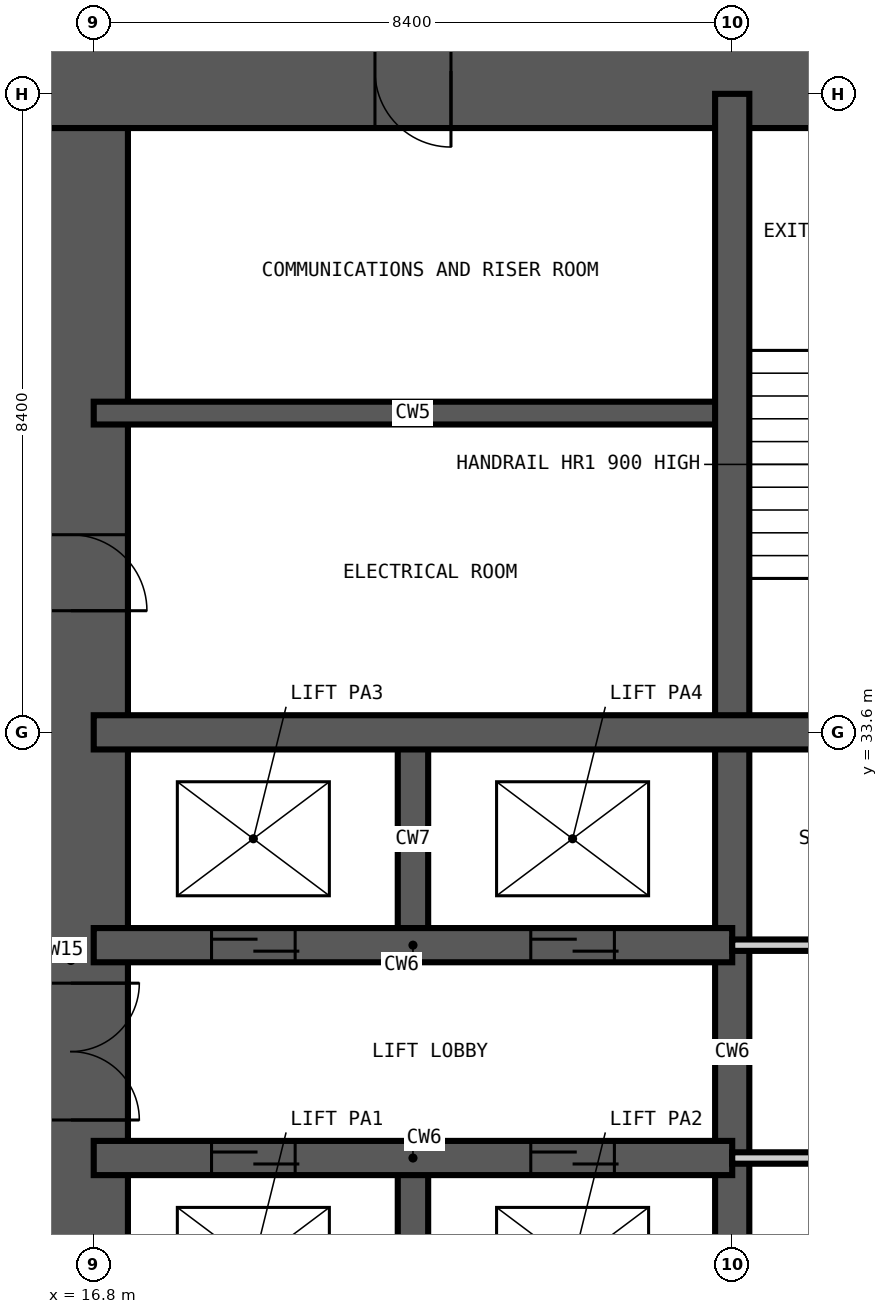
"""IFC4 building model, lengths in metres.
Left out: names, types, materials, properties, quantities, classifications, styles, units other than length and angle.
Written with IfcOpenShell. Run it as: python <this file> out.ifc"""

import sys

from ifc_helpers import new_model, si_unit, direction, frame, frame_2d, origin, place, context, subcontext, project, spatial, rectangle, extrude, element, fill, save


model = new_model("IFC4")
c1 = context("Model", 3, precision=1e-05, world=origin(), true_north=direction((0.0, 1.0)))
c2 = subcontext(c1, "Body", "Model", "MODEL_VIEW")
j1 = project(units=[si_unit("LENGTHUNIT", "METRE"), si_unit("PLANEANGLEUNIT", "RADIAN")], contexts=[c1])
p1 = place(None, origin())
s1 = spatial("IfcSite", under=j1, at=p1, CompositionType="ELEMENT")
p2 = place(p1, origin())
s2 = spatial("IfcBuilding", under=s1, at=p2, CompositionType="ELEMENT")
p3 = place(p2, frame((0.0, 0.0, 63.0)))
s3 = spatial("IfcBuildingStorey", under=s2, at=p3, CompositionType="ELEMENT", Elevation=63.0)
p4 = place(p3, frame((43.05, 42.3, -0.35), z_axis=(0.0, 0.0, 1.0), x_axis=(-1.0, 0.0, 0.0)))
e1 = element("IfcWall", 1, at=p4, inside=s3, PredefinedType="SHEAR", context=c2, shape_type="SweptSolid", body=[
    extrude(rectangle(XDim=27.3, YDim=1.5, at=frame_2d((13.65, 0.0))), origin(), (0.0, 0.0, 1.0), 3.6),
])
p5 = place(p4, frame((21.55, 0.0, 0.35)))
e2 = element("IfcOpeningElement", 2, at=p5, cuts=e1, PredefinedType="OPENING", context=c2, shape_type="SweptSolid", body=[
    extrude(rectangle(XDim=1.0, YDim=2.1, at=frame_2d((0.5, 1.05))), frame((0.0, 0.76, 0.0), z_axis=(0.0, -1.0, 0.0), x_axis=(1.0, 0.0, 0.0)), (0.0, 0.0, 1.0), 1.52),
])
p6 = place(p4, frame((10.95, 0.0, 0.35)))
e3 = element("IfcOpeningElement", 3, at=p6, cuts=e1, PredefinedType="OPENING", context=c2, shape_type="SweptSolid", body=[
    extrude(rectangle(XDim=1.2, YDim=2.2, at=frame_2d((0.6, 1.1))), frame((0.0, 0.76, 0.0), z_axis=(0.0, -1.0, 0.0), x_axis=(1.0, 0.0, 0.0)), (0.0, 0.0, 1.0), 1.52),
])
p7 = place(p3, frame((16.5, 41.55, -0.35), z_axis=(0.0, 0.0, 1.0), x_axis=(0.0, -1.0, 0.0)))
e4 = element("IfcWall", 4, at=p7, inside=s3, PredefinedType="SHEAR", context=c2, shape_type="SweptSolid", body=[
    extrude(rectangle(XDim=24.3, YDim=1.5, at=frame_2d((12.15, 0.0))), origin(), (0.0, 0.0, 1.0), 3.6),
])
p8 = place(p7, frame((11.25, 0.0, 0.35)))
e5 = element("IfcOpeningElement", 5, at=p8, cuts=e4, PredefinedType="OPENING", context=c2, shape_type="SweptSolid", body=[
    extrude(rectangle(XDim=1.8, YDim=2.2, at=frame_2d((0.9, 1.1))), frame((0.0, 0.76, 0.0), z_axis=(0.0, -1.0, 0.0), x_axis=(1.0, 0.0, 0.0)), (0.0, 0.0, 1.0), 1.52),
])
p9 = place(p7, frame((20.05, 0.0, 0.35)))
e6 = element("IfcOpeningElement", 6, at=p9, cuts=e4, PredefinedType="OPENING", context=c2, shape_type="SweptSolid", body=[
    extrude(rectangle(XDim=1.0, YDim=2.1, at=frame_2d((0.5, 1.05))), frame((0.0, 0.76, 0.0), z_axis=(0.0, -1.0, 0.0), x_axis=(1.0, 0.0, 0.0)), (0.0, 0.0, 1.0), 1.52),
])
p10 = place(p7, frame((5.35, 0.0, 0.35)))
e7 = element("IfcOpeningElement", 7, at=p10, cuts=e4, PredefinedType="OPENING", context=c2, shape_type="SweptSolid", body=[
    extrude(rectangle(XDim=1.0, YDim=2.1, at=frame_2d((0.5, 1.05))), frame((0.0, 0.76, 0.0), z_axis=(0.0, -1.0, 0.0), x_axis=(1.0, 0.0, 0.0)), (0.0, 0.0, 1.0), 1.52),
])
p11 = place(p3, frame((16.8, 37.8, -0.35), z_axis=(0.0, 0.0, 1.0), x_axis=(1.0, 0.0, 0.0)))
e8 = element("IfcWall", 8, at=p11, inside=s3, PredefinedType="SHEAR", context=c2, shape_type="SweptSolid", body=[
    extrude(rectangle(XDim=8.4, YDim=0.3, at=frame_2d((4.2, 0.0))), origin(), (0.0, 0.0, 1.0), 3.6),
])
for number, where, z_axis, x_axis in (
    (9, (21.0, 25.2, -0.35), (0.0, 0.0, 1.0), (0.0, 1.0, 0.0)),
    (10, (21.0, 30.8, -0.35), (0.0, 0.0, 1.0), (0.0, 1.0, 0.0)),
):
    element("IfcWall", number, at=place(p3, frame(where, z_axis=z_axis, x_axis=x_axis)), inside=s3, PredefinedType="SHEAR", context=c2, shape_type="SweptSolid", body=[
        extrude(rectangle(XDim=2.8, YDim=0.4, at=frame_2d((1.4, 0.0))), origin(), (0.0, 0.0, 1.0), 3.6),
    ])
p12 = place(p3, frame((25.2, 16.8, -0.35), z_axis=(0.0, 0.0, 1.0), x_axis=(0.0, 1.0, 0.0)))
e11 = element("IfcWall", 11, at=p12, inside=s3, PredefinedType="SHEAR", context=c2, shape_type="SweptSolid", body=[
    extrude(rectangle(XDim=25.2, YDim=0.45, at=frame_2d((12.6, 0.0))), origin(), (0.0, 0.0, 1.0), 3.6),
])
p13 = place(p3, frame((16.8, 28.0, -0.35), z_axis=(0.0, 0.0, 1.0), x_axis=(1.0, 0.0, 0.0)))
e12 = element("IfcWall", 12, at=p13, inside=s3, PredefinedType="SHEAR", context=c2, shape_type="SweptSolid", body=[
    extrude(rectangle(XDim=8.4, YDim=0.45, at=frame_2d((4.2, 0.0))), origin(), (0.0, 0.0, 1.0), 3.6),
])
p14 = place(p13, frame((1.55, 0.0, 0.35)))
e13 = element("IfcOpeningElement", 13, at=p14, cuts=e12, PredefinedType="OPENING", context=c2, shape_type="SweptSolid", body=[
    extrude(rectangle(XDim=1.1, YDim=2.2, at=frame_2d((0.55, 1.1))), frame((0.0, 0.235, 0.0), z_axis=(0.0, -1.0, 0.0), x_axis=(1.0, 0.0, 0.0)), (0.0, 0.0, 1.0), 0.47),
])
p15 = place(p13, frame((5.75, 0.0, 0.35)))
e14 = element("IfcOpeningElement", 14, at=p15, cuts=e12, PredefinedType="OPENING", context=c2, shape_type="SweptSolid", body=[
    extrude(rectangle(XDim=1.1, YDim=2.2, at=frame_2d((0.55, 1.1))), frame((0.0, 0.235, 0.0), z_axis=(0.0, -1.0, 0.0), x_axis=(1.0, 0.0, 0.0)), (0.0, 0.0, 1.0), 0.47),
])
p16 = place(p3, frame((16.8, 30.8, -0.35), z_axis=(0.0, 0.0, 1.0), x_axis=(1.0, 0.0, 0.0)))
e15 = element("IfcWall", 15, at=p16, inside=s3, PredefinedType="SHEAR", context=c2, shape_type="SweptSolid", body=[
    extrude(rectangle(XDim=8.4, YDim=0.45, at=frame_2d((4.2, 0.0))), origin(), (0.0, 0.0, 1.0), 3.6),
])
p17 = place(p16, frame((1.55, 0.0, 0.35)))
e16 = element("IfcOpeningElement", 16, at=p17, cuts=e15, PredefinedType="OPENING", context=c2, shape_type="SweptSolid", body=[
    extrude(rectangle(XDim=1.1, YDim=2.2, at=frame_2d((0.55, 1.1))), frame((0.0, 0.235, 0.0), z_axis=(0.0, -1.0, 0.0), x_axis=(1.0, 0.0, 0.0)), (0.0, 0.0, 1.0), 0.47),
])
p18 = place(p16, frame((5.75, 0.0, 0.35)))
e17 = element("IfcOpeningElement", 17, at=p18, cuts=e15, PredefinedType="OPENING", context=c2, shape_type="SweptSolid", body=[
    extrude(rectangle(XDim=1.1, YDim=2.2, at=frame_2d((0.55, 1.1))), frame((0.0, 0.235, 0.0), z_axis=(0.0, -1.0, 0.0), x_axis=(1.0, 0.0, 0.0)), (0.0, 0.0, 1.0), 0.47),
])
p19 = place(p3, frame((16.8, 33.6, -0.35), z_axis=(0.0, 0.0, 1.0), x_axis=(1.0, 0.0, 0.0)))
e18 = element("IfcWall", 18, at=p19, inside=s3, PredefinedType="SHEAR", context=c2, shape_type="SweptSolid", body=[
    extrude(rectangle(XDim=25.2, YDim=0.45, at=frame_2d((12.6, 0.0))), origin(), (0.0, 0.0, 1.0), 3.6),
])
p20 = place(p3, frame((25.2, 28.0, 0.0), z_axis=(0.0, 0.0, 1.0), x_axis=(1.0, 0.0, 0.0)))
e19 = element("IfcWall", 19, at=p20, inside=s3, PredefinedType="PARTITIONING", context=c2, shape_type="SweptSolid", body=[
    extrude(rectangle(XDim=8.4, YDim=0.15, at=frame_2d((4.2, 0.0))), origin(), (0.0, 0.0, 1.0), 3.25),
])
p21 = place(p20, frame((3.7, 0.0, 0.0)))
e20 = element("IfcOpeningElement", 20, at=p21, cuts=e19, PredefinedType="OPENING", context=c2, shape_type="SweptSolid", body=[
    extrude(rectangle(XDim=1.0, YDim=2.1, at=frame_2d((0.5, 1.05))), frame((0.0, 0.085, 0.0), z_axis=(0.0, -1.0, 0.0), x_axis=(1.0, 0.0, 0.0)), (0.0, 0.0, 1.0), 0.17),
])
p22 = place(p3, frame((25.2, 30.8, 0.0), z_axis=(0.0, 0.0, 1.0), x_axis=(1.0, 0.0, 0.0)))
e21 = element("IfcWall", 21, at=p22, inside=s3, PredefinedType="PARTITIONING", context=c2, shape_type="SweptSolid", body=[
    extrude(rectangle(XDim=8.4, YDim=0.15, at=frame_2d((4.2, 0.0))), origin(), (0.0, 0.0, 1.0), 3.25),
])
p23 = place(p22, frame((5.8, 0.0, 0.0)))
e22 = element("IfcOpeningElement", 22, at=p23, cuts=e21, PredefinedType="OPENING", context=c2, shape_type="SweptSolid", body=[
    extrude(rectangle(XDim=1.0, YDim=2.1, at=frame_2d((0.5, 1.05))), frame((0.0, 0.085, 0.0), z_axis=(0.0, -1.0, 0.0), x_axis=(1.0, 0.0, 0.0)), (0.0, 0.0, 1.0), 0.17),
])
p24 = place(p22, frame((1.6, 0.0, 0.0)))
e23 = element("IfcOpeningElement", 23, at=p24, cuts=e21, PredefinedType="OPENING", context=c2, shape_type="SweptSolid", body=[
    extrude(rectangle(XDim=1.0, YDim=2.1, at=frame_2d((0.5, 1.05))), frame((0.0, 0.085, 0.0), z_axis=(0.0, -1.0, 0.0), x_axis=(1.0, 0.0, 0.0)), (0.0, 0.0, 1.0), 0.17),
])
p25 = place(p14, origin())
e24 = element("IfcDoor", 24, at=p25, inside=s3, OperationType="DOUBLE_DOOR_SLIDING", PredefinedType="DOOR", context=c2, shape_type="SweptSolid", body=[
    extrude(rectangle(XDim=1.1, YDim=2.2, at=frame_2d((0.55, 1.1))), frame((0.0, 0.025, 0.0), z_axis=(0.0, -1.0, 0.0), x_axis=(1.0, 0.0, 0.0)), (0.0, 0.0, 1.0), 0.05),
])
fill(e13, e24)
p26 = place(p15, origin())
e25 = element("IfcDoor", 25, at=p26, inside=s3, OperationType="DOUBLE_DOOR_SLIDING", PredefinedType="DOOR", context=c2, shape_type="SweptSolid", body=[
    extrude(rectangle(XDim=1.1, YDim=2.2, at=frame_2d((0.55, 1.1))), frame((0.0, 0.025, 0.0), z_axis=(0.0, -1.0, 0.0), x_axis=(1.0, 0.0, 0.0)), (0.0, 0.0, 1.0), 0.05),
])
fill(e14, e25)
p27 = place(p17, origin())
e26 = element("IfcDoor", 26, at=p27, inside=s3, OperationType="DOUBLE_DOOR_SLIDING", PredefinedType="DOOR", context=c2, shape_type="SweptSolid", body=[
    extrude(rectangle(XDim=1.1, YDim=2.2, at=frame_2d((0.55, 1.1))), frame((0.0, 0.025, 0.0), z_axis=(0.0, -1.0, 0.0), x_axis=(1.0, 0.0, 0.0)), (0.0, 0.0, 1.0), 0.05),
])
fill(e16, e26)
p28 = place(p18, origin())
e27 = element("IfcDoor", 27, at=p28, inside=s3, OperationType="DOUBLE_DOOR_SLIDING", PredefinedType="DOOR", context=c2, shape_type="SweptSolid", body=[
    extrude(rectangle(XDim=1.1, YDim=2.2, at=frame_2d((0.55, 1.1))), frame((0.0, 0.025, 0.0), z_axis=(0.0, -1.0, 0.0), x_axis=(1.0, 0.0, 0.0)), (0.0, 0.0, 1.0), 0.05),
])
fill(e17, e27)
p29 = place(p8, origin())
e28 = element("IfcDoor", 28, at=p29, inside=s3, OperationType="DOUBLE_DOOR_DOUBLE_SWING", PredefinedType="DOOR", context=c2, shape_type="SweptSolid", body=[
    extrude(rectangle(XDim=1.8, YDim=2.2, at=frame_2d((0.9, 1.1))), frame((0.0, 0.025, 0.0), z_axis=(0.0, -1.0, 0.0), x_axis=(1.0, 0.0, 0.0)), (0.0, 0.0, 1.0), 0.05),
])
fill(e5, e28)
p30 = place(p10, origin())
e29 = element("IfcDoor", 29, at=p30, inside=s3, OperationType="SINGLE_SWING_RIGHT", PredefinedType="DOOR", context=c2, shape_type="SweptSolid", body=[
    extrude(rectangle(XDim=1.0, YDim=2.1, at=frame_2d((0.5, 1.05))), frame((0.0, 0.025, 0.0), z_axis=(0.0, -1.0, 0.0), x_axis=(1.0, 0.0, 0.0)), (0.0, 0.0, 1.0), 0.05),
])
fill(e7, e29)
p31 = place(p5, origin())
e30 = element("IfcDoor", 30, at=p31, inside=s3, OperationType="SINGLE_SWING_LEFT", PredefinedType="DOOR", context=c2, shape_type="SweptSolid", body=[
    extrude(rectangle(XDim=1.0, YDim=2.1, at=frame_2d((0.5, 1.05))), frame((0.0, 0.025, 0.0), z_axis=(0.0, -1.0, 0.0), x_axis=(1.0, 0.0, 0.0)), (0.0, 0.0, 1.0), 0.05),
])
fill(e2, e30)
save(model, sys.argv[1])
